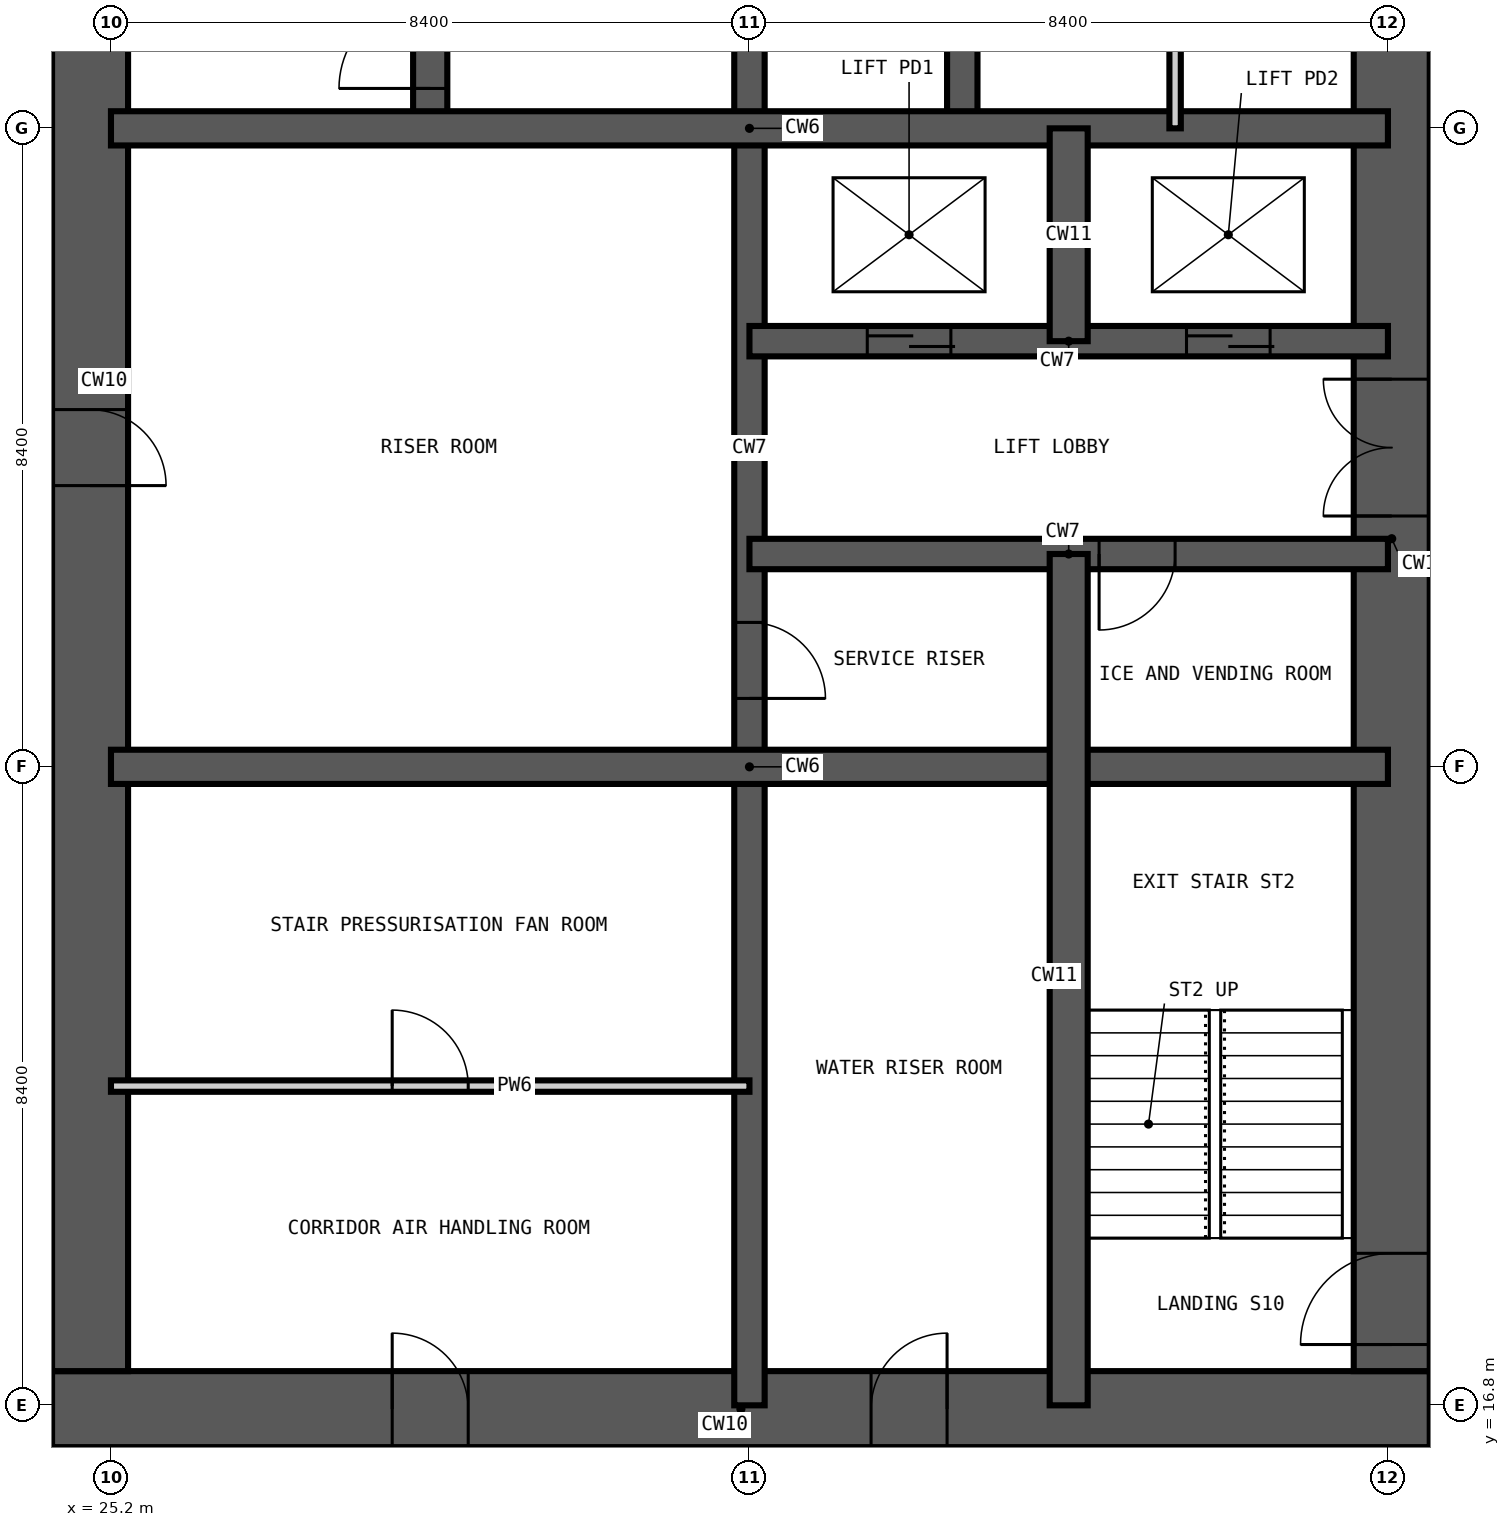
"""IFC4 building model, lengths in metres.
Left out: names, types, materials, properties, quantities, classifications, styles, units other than length and angle.
Written with IfcOpenShell. Run it as: python <this file> out.ifc"""

import sys

from ifc_helpers import new_model, si_unit, direction, frame, frame_2d, origin, place, context, subcontext, project, spatial, rectangle, extrude, element, fill, save


model = new_model("IFC4")
c1 = context("Model", 3, precision=1e-05, world=origin(), true_north=direction((0.0, 1.0)))
c2 = subcontext(c1, "Body", "Model", "MODEL_VIEW")
j1 = project(units=[si_unit("LENGTHUNIT", "METRE"), si_unit("PLANEANGLEUNIT", "RADIAN")], contexts=[c1])
p1 = place(None, origin())
s1 = spatial("IfcSite", under=j1, at=p1, CompositionType="ELEMENT")
p2 = place(p1, origin())
s2 = spatial("IfcBuilding", under=s1, at=p2, CompositionType="ELEMENT")
p3 = place(p2, frame((0.0, 0.0, 229.5)))
s3 = spatial("IfcBuildingStorey", under=s2, at=p3, CompositionType="ELEMENT", Elevation=229.5)
p4 = place(p3, frame((24.425, 16.75, -0.35), z_axis=(0.0, 0.0, 1.0), x_axis=(1.0, 0.0, 0.0)))
e1 = element("IfcWall", 1, at=p4, inside=s3, PredefinedType="SHEAR", context=c2, shape_type="SweptSolid", body=[
    extrude(rectangle(XDim=18.125, YDim=1.0, at=frame_2d((9.062, 0.0))), origin(), (0.0, 0.0, 1.0), 3.9),
])
p5 = place(p4, frame((4.475, 0.0, 0.35)))
e2 = element("IfcOpeningElement", 2, at=p5, cuts=e1, PredefinedType="OPENING", context=c2, shape_type="SweptSolid", body=[
    extrude(rectangle(XDim=1.0, YDim=2.1, at=frame_2d((0.5, 1.05))), frame((0.0, 0.51, 0.0), z_axis=(0.0, -1.0, 0.0), x_axis=(1.0, 0.0, 0.0)), (0.0, 0.0, 1.0), 1.02),
])
p6 = place(p4, frame((10.775, 0.0, 0.35)))
e3 = element("IfcOpeningElement", 3, at=p6, cuts=e1, PredefinedType="OPENING", context=c2, shape_type="SweptSolid", body=[
    extrude(rectangle(XDim=1.0, YDim=2.1, at=frame_2d((0.5, 1.05))), frame((0.0, 0.51, 0.0), z_axis=(0.0, -1.0, 0.0), x_axis=(1.0, 0.0, 0.0)), (0.0, 0.0, 1.0), 1.02),
])
p7 = place(p3, frame((42.05, 17.25, -0.35), z_axis=(0.0, 0.0, 1.0), x_axis=(0.0, 1.0, 0.0)))
e4 = element("IfcWall", 4, at=p7, inside=s3, PredefinedType="SHEAR", context=c2, shape_type="SweptSolid", body=[
    extrude(rectangle(XDim=24.3, YDim=1.0, at=frame_2d((12.15, 0.0))), origin(), (0.0, 0.0, 1.0), 3.9),
])
p8 = place(p7, frame((0.35, 0.0, 0.35)))
e5 = element("IfcOpeningElement", 5, at=p8, cuts=e4, PredefinedType="OPENING", context=c2, shape_type="SweptSolid", body=[
    extrude(rectangle(XDim=1.2, YDim=2.2, at=frame_2d((0.6, 1.1))), frame((0.0, 0.51, 0.0), z_axis=(0.0, -1.0, 0.0), x_axis=(1.0, 0.0, 0.0)), (0.0, 0.0, 1.0), 1.02),
])
p9 = place(p7, frame((11.25, 0.0, 0.35)))
e6 = element("IfcOpeningElement", 6, at=p9, cuts=e4, PredefinedType="OPENING", context=c2, shape_type="SweptSolid", body=[
    extrude(rectangle(XDim=1.8, YDim=2.2, at=frame_2d((0.9, 1.1))), frame((0.0, 0.51, 0.0), z_axis=(0.0, -1.0, 0.0), x_axis=(1.0, 0.0, 0.0)), (0.0, 0.0, 1.0), 1.02),
])
p10 = place(p7, frame((20.05, 0.0, 0.35)))
e7 = element("IfcOpeningElement", 7, at=p10, cuts=e4, PredefinedType="OPENING", context=c2, shape_type="SweptSolid", body=[
    extrude(rectangle(XDim=1.0, YDim=2.1, at=frame_2d((0.5, 1.05))), frame((0.0, 0.51, 0.0), z_axis=(0.0, -1.0, 0.0), x_axis=(1.0, 0.0, 0.0)), (0.0, 0.0, 1.0), 1.02),
])
p11 = place(p3, frame((24.925, 41.55, -0.35), z_axis=(0.0, 0.0, 1.0), x_axis=(0.0, -1.0, 0.0)))
e8 = element("IfcWall", 8, at=p11, inside=s3, PredefinedType="SHEAR", context=c2, shape_type="SweptSolid", body=[
    extrude(rectangle(XDim=24.3, YDim=1.0, at=frame_2d((12.15, 0.0))), origin(), (0.0, 0.0, 1.0), 3.9),
])
p12 = place(p11, frame((11.65, 0.0, 0.35)))
e9 = element("IfcOpeningElement", 9, at=p12, cuts=e8, PredefinedType="OPENING", context=c2, shape_type="SweptSolid", body=[
    extrude(rectangle(XDim=1.0, YDim=2.1, at=frame_2d((0.5, 1.05))), frame((0.0, 0.51, 0.0), z_axis=(0.0, -1.0, 0.0), x_axis=(1.0, 0.0, 0.0)), (0.0, 0.0, 1.0), 1.02),
])
p13 = place(p3, frame((33.6, 16.8, -0.35), z_axis=(0.0, 0.0, 1.0), x_axis=(0.0, 1.0, 0.0)))
e10 = element("IfcWall", 10, at=p13, inside=s3, PredefinedType="SHEAR", context=c2, shape_type="SweptSolid", body=[
    extrude(rectangle(XDim=25.2, YDim=0.4, at=frame_2d((12.6, 0.0))), origin(), (0.0, 0.0, 1.0), 3.9),
])
p14 = place(p13, frame((22.5, 0.0, 0.35)))
e11 = element("IfcOpeningElement", 11, at=p14, cuts=e10, PredefinedType="OPENING", context=c2, shape_type="SweptSolid", body=[
    extrude(rectangle(XDim=1.2, YDim=2.2, at=frame_2d((0.6, 1.1))), frame((0.0, 0.21, 0.0), z_axis=(0.0, -1.0, 0.0), x_axis=(1.0, 0.0, 0.0)), (0.0, 0.0, 1.0), 0.42),
])
p15 = place(p13, frame((18.3, 0.0, 0.35)))
e12 = element("IfcOpeningElement", 12, at=p15, cuts=e10, PredefinedType="OPENING", context=c2, shape_type="SweptSolid", body=[
    extrude(rectangle(XDim=1.2, YDim=2.2, at=frame_2d((0.6, 1.1))), frame((0.0, 0.21, 0.0), z_axis=(0.0, -1.0, 0.0), x_axis=(1.0, 0.0, 0.0)), (0.0, 0.0, 1.0), 0.42),
])
p16 = place(p13, frame((9.3, 0.0, 0.35)))
e13 = element("IfcOpeningElement", 13, at=p16, cuts=e10, PredefinedType="OPENING", context=c2, shape_type="SweptSolid", body=[
    extrude(rectangle(XDim=1.0, YDim=2.1, at=frame_2d((0.5, 1.05))), frame((0.0, 0.21, 0.0), z_axis=(0.0, -1.0, 0.0), x_axis=(1.0, 0.0, 0.0)), (0.0, 0.0, 1.0), 0.42),
])
p17 = place(p3, frame((36.4, 33.6, -0.35), z_axis=(0.0, 0.0, 1.0), x_axis=(0.0, 1.0, 0.0)))
e14 = element("IfcWall", 14, at=p17, inside=s3, PredefinedType="SHEAR", context=c2, shape_type="SweptSolid", body=[
    extrude(rectangle(XDim=8.4, YDim=0.4, at=frame_2d((4.2, 0.0))), origin(), (0.0, 0.0, 1.0), 3.9),
])
p18 = place(p3, frame((33.6, 28.0, -0.35), z_axis=(0.0, 0.0, 1.0), x_axis=(1.0, 0.0, 0.0)))
e15 = element("IfcWall", 15, at=p18, inside=s3, PredefinedType="SHEAR", context=c2, shape_type="SweptSolid", body=[
    extrude(rectangle(XDim=8.4, YDim=0.4, at=frame_2d((4.2, 0.0))), origin(), (0.0, 0.0, 1.0), 3.9),
])
p19 = place(p18, frame((4.6, 0.0, 0.35)))
e16 = element("IfcOpeningElement", 16, at=p19, cuts=e15, PredefinedType="OPENING", context=c2, shape_type="SweptSolid", body=[
    extrude(rectangle(XDim=1.0, YDim=2.1, at=frame_2d((0.5, 1.05))), frame((0.0, 0.21, 0.0), z_axis=(0.0, -1.0, 0.0), x_axis=(1.0, 0.0, 0.0)), (0.0, 0.0, 1.0), 0.42),
])
p20 = place(p3, frame((33.6, 30.8, -0.35), z_axis=(0.0, 0.0, 1.0), x_axis=(1.0, 0.0, 0.0)))
e17 = element("IfcWall", 17, at=p20, inside=s3, PredefinedType="SHEAR", context=c2, shape_type="SweptSolid", body=[
    extrude(rectangle(XDim=8.4, YDim=0.4, at=frame_2d((4.2, 0.0))), origin(), (0.0, 0.0, 1.0), 3.9),
])
p21 = place(p20, frame((1.55, 0.0, 0.35)))
e18 = element("IfcOpeningElement", 18, at=p21, cuts=e17, PredefinedType="OPENING", context=c2, shape_type="SweptSolid", body=[
    extrude(rectangle(XDim=1.1, YDim=2.2, at=frame_2d((0.55, 1.1))), frame((0.0, 0.21, 0.0), z_axis=(0.0, -1.0, 0.0), x_axis=(1.0, 0.0, 0.0)), (0.0, 0.0, 1.0), 0.42),
])
p22 = place(p20, frame((5.75, 0.0, 0.35)))
e19 = element("IfcOpeningElement", 19, at=p22, cuts=e17, PredefinedType="OPENING", context=c2, shape_type="SweptSolid", body=[
    extrude(rectangle(XDim=1.1, YDim=2.2, at=frame_2d((0.55, 1.1))), frame((0.0, 0.21, 0.0), z_axis=(0.0, -1.0, 0.0), x_axis=(1.0, 0.0, 0.0)), (0.0, 0.0, 1.0), 0.42),
])
p23 = place(p3, frame((29.4, 33.6, -0.35), z_axis=(0.0, 0.0, 1.0), x_axis=(0.0, 1.0, 0.0)))
e20 = element("IfcWall", 20, at=p23, inside=s3, PredefinedType="SHEAR", context=c2, shape_type="SweptSolid", body=[
    extrude(rectangle(XDim=8.4, YDim=0.45, at=frame_2d((4.2, 0.0))), origin(), (0.0, 0.0, 1.0), 3.9),
])
p24 = place(p23, frame((0.525, 0.0, 0.35)))
e21 = element("IfcOpeningElement", 21, at=p24, cuts=e20, PredefinedType="OPENING", context=c2, shape_type="SweptSolid", body=[
    extrude(rectangle(XDim=1.2, YDim=2.2, at=frame_2d((0.6, 1.1))), frame((0.0, 0.235, 0.0), z_axis=(0.0, -1.0, 0.0), x_axis=(1.0, 0.0, 0.0)), (0.0, 0.0, 1.0), 0.47),
])
for number, where, z_axis, x_axis in (
    (22, (25.2, 25.2, -0.35), (0.0, 0.0, 1.0), (1.0, 0.0, 0.0)),
    (23, (25.2, 33.6, -0.35), (0.0, 0.0, 1.0), (1.0, 0.0, 0.0)),
):
    element("IfcWall", number, at=place(p3, frame(where, z_axis=z_axis, x_axis=x_axis)), inside=s3, PredefinedType="SHEAR", context=c2, shape_type="SweptSolid", body=[
        extrude(rectangle(XDim=16.8, YDim=0.45, at=frame_2d((8.4, 0.0))), origin(), (0.0, 0.0, 1.0), 3.9),
    ])
p25 = place(p3, frame((37.8, 16.8, -0.35), z_axis=(0.0, 0.0, 1.0), x_axis=(0.0, 1.0, 0.0)))
e24 = element("IfcWall", 24, at=p25, inside=s3, PredefinedType="SHEAR", context=c2, shape_type="SweptSolid", body=[
    extrude(rectangle(XDim=11.2, YDim=0.5, at=frame_2d((5.6, 0.0))), origin(), (0.0, 0.0, 1.0), 3.9),
])
p26 = place(p3, frame((37.8, 30.8, -0.35), z_axis=(0.0, 0.0, 1.0), x_axis=(0.0, 1.0, 0.0)))
e25 = element("IfcWall", 25, at=p26, inside=s3, PredefinedType="SHEAR", context=c2, shape_type="SweptSolid", body=[
    extrude(rectangle(XDim=2.8, YDim=0.5, at=frame_2d((1.4, 0.0))), origin(), (0.0, 0.0, 1.0), 3.9),
])
p27 = place(p3, frame((39.2, 33.6, 0.0), z_axis=(0.0, 0.0, 1.0), x_axis=(0.0, 1.0, 0.0)))
e26 = element("IfcWall", 26, at=p27, inside=s3, PredefinedType="PARTITIONING", context=c2, shape_type="SweptSolid", body=[
    extrude(rectangle(XDim=8.4, YDim=0.15, at=frame_2d((4.2, 0.0))), origin(), (0.0, 0.0, 1.0), 3.55),
])
p28 = place(p27, frame((3.7, 0.0, 0.0)))
e27 = element("IfcOpeningElement", 27, at=p28, cuts=e26, PredefinedType="OPENING", context=c2, shape_type="SweptSolid", body=[
    extrude(rectangle(XDim=1.0, YDim=2.1, at=frame_2d((0.5, 1.05))), frame((0.0, 0.085, 0.0), z_axis=(0.0, -1.0, 0.0), x_axis=(1.0, 0.0, 0.0)), (0.0, 0.0, 1.0), 0.17),
])
p29 = place(p3, frame((25.2, 21.0, 0.0), z_axis=(0.0, 0.0, 1.0), x_axis=(1.0, 0.0, 0.0)))
e28 = element("IfcWall", 28, at=p29, inside=s3, PredefinedType="PARTITIONING", context=c2, shape_type="SweptSolid", body=[
    extrude(rectangle(XDim=8.4, YDim=0.15, at=frame_2d((4.2, 0.0))), origin(), (0.0, 0.0, 1.0), 3.55),
])
p30 = place(p29, frame((3.7, 0.0, 0.0)))
e29 = element("IfcOpeningElement", 29, at=p30, cuts=e28, PredefinedType="OPENING", context=c2, shape_type="SweptSolid", body=[
    extrude(rectangle(XDim=1.0, YDim=2.1, at=frame_2d((0.5, 1.05))), frame((0.0, 0.085, 0.0), z_axis=(0.0, -1.0, 0.0), x_axis=(1.0, 0.0, 0.0)), (0.0, 0.0, 1.0), 0.17),
])
p31 = place(p24, origin())
e30 = element("IfcDoor", 30, at=p31, inside=s3, OperationType="SINGLE_SWING_LEFT", PredefinedType="DOOR", context=c2, shape_type="SweptSolid", body=[
    extrude(rectangle(XDim=1.2, YDim=2.2, at=frame_2d((0.6, 1.1))), frame((0.0, 0.025, 0.0), z_axis=(0.0, -1.0, 0.0), x_axis=(1.0, 0.0, 0.0)), (0.0, 0.0, 1.0), 0.05),
])
fill(e21, e30)
p32 = place(p8, origin())
e31 = element("IfcDoor", 31, at=p32, inside=s3, OperationType="SINGLE_SWING_LEFT", PredefinedType="DOOR", context=c2, shape_type="SweptSolid", body=[
    extrude(rectangle(XDim=1.2, YDim=2.2, at=frame_2d((0.6, 1.1))), frame((0.0, 0.025, 0.0), z_axis=(0.0, -1.0, 0.0), x_axis=(1.0, 0.0, 0.0)), (0.0, 0.0, 1.0), 0.05),
])
fill(e5, e31)
p33 = place(p21, origin())
e32 = element("IfcDoor", 32, at=p33, inside=s3, OperationType="DOUBLE_DOOR_SLIDING", PredefinedType="DOOR", context=c2, shape_type="SweptSolid", body=[
    extrude(rectangle(XDim=1.1, YDim=2.2, at=frame_2d((0.55, 1.1))), frame((0.0, 0.025, 0.0), z_axis=(0.0, -1.0, 0.0), x_axis=(1.0, 0.0, 0.0)), (0.0, 0.0, 1.0), 0.05),
])
fill(e18, e32)
p34 = place(p22, origin())
e33 = element("IfcDoor", 33, at=p34, inside=s3, OperationType="DOUBLE_DOOR_SLIDING", PredefinedType="DOOR", context=c2, shape_type="SweptSolid", body=[
    extrude(rectangle(XDim=1.1, YDim=2.2, at=frame_2d((0.55, 1.1))), frame((0.0, 0.025, 0.0), z_axis=(0.0, -1.0, 0.0), x_axis=(1.0, 0.0, 0.0)), (0.0, 0.0, 1.0), 0.05),
])
fill(e19, e33)
p35 = place(p12, origin())
e34 = element("IfcDoor", 34, at=p35, inside=s3, OperationType="SINGLE_SWING_RIGHT", PredefinedType="DOOR", context=c2, shape_type="SweptSolid", body=[
    extrude(rectangle(XDim=1.0, YDim=2.1, at=frame_2d((0.5, 1.05))), frame((0.0, 0.025, 0.0), z_axis=(0.0, -1.0, 0.0), x_axis=(1.0, 0.0, 0.0)), (0.0, 0.0, 1.0), 0.05),
])
fill(e9, e34)
p36 = place(p16, frame((1.0, 0.0, 0.0), z_axis=(0.0, 0.0, 1.0), x_axis=(-1.0, 0.0, 0.0)))
e35 = element("IfcDoor", 35, at=p36, inside=s3, OperationType="SINGLE_SWING_RIGHT", PredefinedType="DOOR", context=c2, shape_type="SweptSolid", body=[
    extrude(rectangle(XDim=1.0, YDim=2.1, at=frame_2d((0.5, 1.05))), frame((0.0, 0.025, 0.0), z_axis=(0.0, -1.0, 0.0), x_axis=(1.0, 0.0, 0.0)), (0.0, 0.0, 1.0), 0.05),
])
fill(e13, e35)
p37 = place(p19, frame((1.0, 0.0, 0.0), z_axis=(0.0, 0.0, 1.0), x_axis=(-1.0, 0.0, 0.0)))
e36 = element("IfcDoor", 36, at=p37, inside=s3, OperationType="SINGLE_SWING_RIGHT", PredefinedType="DOOR", context=c2, shape_type="SweptSolid", body=[
    extrude(rectangle(XDim=1.0, YDim=2.1, at=frame_2d((0.5, 1.05))), frame((0.0, 0.025, 0.0), z_axis=(0.0, -1.0, 0.0), x_axis=(1.0, 0.0, 0.0)), (0.0, 0.0, 1.0), 0.05),
])
fill(e16, e36)
p38 = place(p9, origin())
e37 = element("IfcDoor", 37, at=p38, inside=s3, OperationType="DOUBLE_DOOR_DOUBLE_SWING", PredefinedType="DOOR", context=c2, shape_type="SweptSolid", body=[
    extrude(rectangle(XDim=1.8, YDim=2.2, at=frame_2d((0.9, 1.1))), frame((0.0, 0.025, 0.0), z_axis=(0.0, -1.0, 0.0), x_axis=(1.0, 0.0, 0.0)), (0.0, 0.0, 1.0), 0.05),
])
fill(e6, e37)
p39 = place(p5, origin())
e38 = element("IfcDoor", 38, at=p39, inside=s3, OperationType="SINGLE_SWING_LEFT", PredefinedType="DOOR", context=c2, shape_type="SweptSolid", body=[
    extrude(rectangle(XDim=1.0, YDim=2.1, at=frame_2d((0.5, 1.05))), frame((0.0, 0.025, 0.0), z_axis=(0.0, -1.0, 0.0), x_axis=(1.0, 0.0, 0.0)), (0.0, 0.0, 1.0), 0.05),
])
fill(e2, e38)
p40 = place(p30, origin())
e39 = element("IfcDoor", 39, at=p40, inside=s3, OperationType="SINGLE_SWING_LEFT", PredefinedType="DOOR", context=c2, shape_type="SweptSolid", body=[
    extrude(rectangle(XDim=1.0, YDim=2.1, at=frame_2d((0.5, 1.05))), frame((0.0, 0.025, 0.0), z_axis=(0.0, -1.0, 0.0), x_axis=(1.0, 0.0, 0.0)), (0.0, 0.0, 1.0), 0.05),
])
fill(e29, e39)
p41 = place(p6, origin())
e40 = element("IfcDoor", 40, at=p41, inside=s3, OperationType="SINGLE_SWING_RIGHT", PredefinedType="DOOR", context=c2, shape_type="SweptSolid", body=[
    extrude(rectangle(XDim=1.0, YDim=2.1, at=frame_2d((0.5, 1.05))), frame((0.0, 0.025, 0.0), z_axis=(0.0, -1.0, 0.0), x_axis=(1.0, 0.0, 0.0)), (0.0, 0.0, 1.0), 0.05),
])
fill(e3, e40)
save(model, sys.argv[1])
